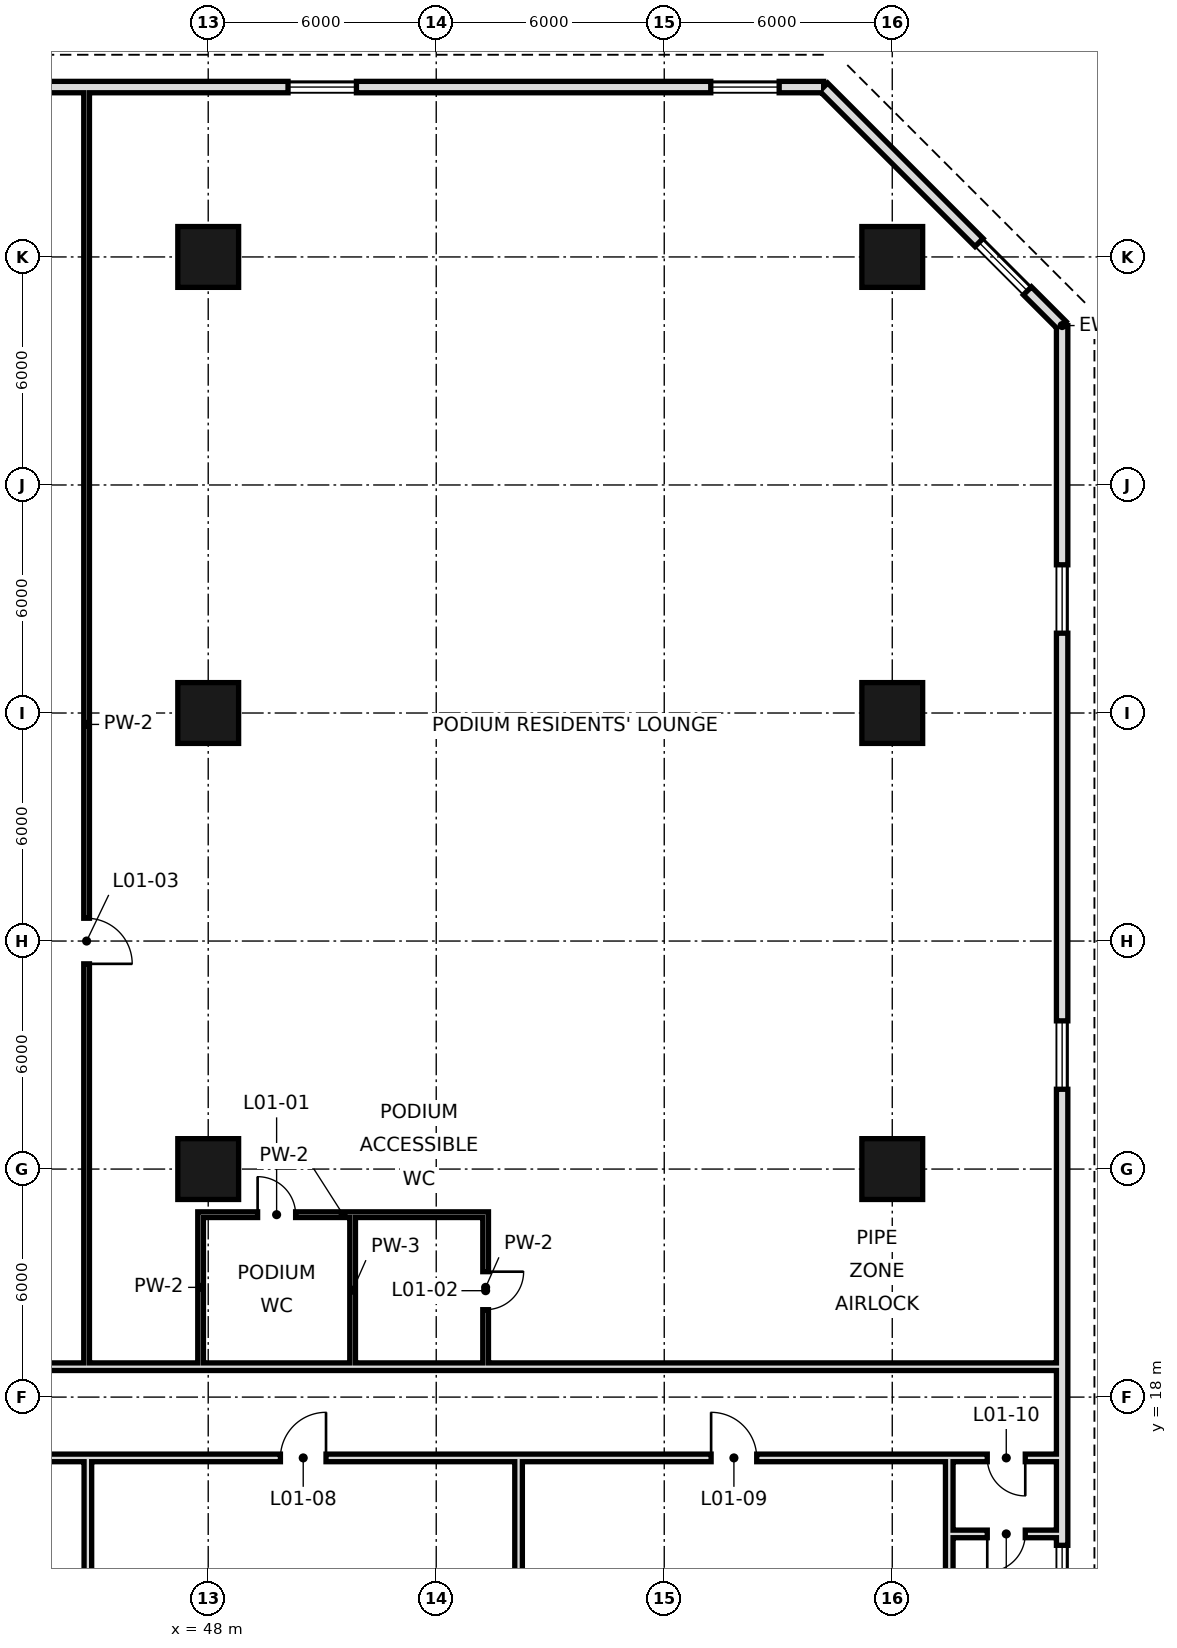
"""IFC4 building model, lengths in metres.
Left out: names, types, materials, properties, quantities, classifications, styles, units other than length and angle.
Written with IfcOpenShell. Run it as: python <this file> out.ifc"""

import sys

from ifc_helpers import new_model, si_unit, direction, frame, frame_2d, origin, origin_2d, place, context, subcontext, project, spatial, rectangle, hollow_rectangle, extrude, element, fill, save


model = new_model("IFC4")
c1 = context("Model", 3, precision=1e-05, world=origin(), true_north=direction((0.0, 1.0)))
c2 = subcontext(c1, "Body", "Model", "MODEL_VIEW")
j1 = project(units=[si_unit("LENGTHUNIT", "METRE"), si_unit("PLANEANGLEUNIT", "RADIAN")], contexts=[c1])
p1 = place(None, origin())
s1 = spatial("IfcSite", under=j1, at=p1, CompositionType="ELEMENT")
p2 = place(p1, origin())
s2 = spatial("IfcBuilding", under=s1, at=p2, CompositionType="ELEMENT")
p3 = place(p2, frame((0.0, 0.0, 15.0)))
s3 = spatial("IfcBuildingStorey", under=s2, at=p3, CompositionType="ELEMENT", Elevation=15.0)
for number, where, z_axis, x_axis in (
    (1, (48.0, 24.0, 0.0), (0.0, 0.0, 1.0), (1.0, 0.0, 0.0)),
    (2, (48.0, 36.0, 0.0), (0.0, 0.0, 1.0), (1.0, 0.0, 0.0)),
    (3, (48.0, 48.0, 0.0), (0.0, 0.0, 1.0), (1.0, 0.0, 0.0)),
    (4, (66.0, 24.0, 0.0), (0.0, 0.0, 1.0), (1.0, 0.0, 0.0)),
    (5, (66.0, 36.0, 0.0), (0.0, 0.0, 1.0), (1.0, 0.0, 0.0)),
    (6, (66.0, 48.0, 0.0), (0.0, 0.0, 1.0), (1.0, 0.0, 0.0)),
):
    element("IfcColumn", number, at=place(p3, frame(where, z_axis=z_axis, x_axis=x_axis)), inside=s3, PredefinedType="COLUMN", context=c2, shape_type="SweptSolid", body=[
        extrude(hollow_rectangle(XDim=1.6, YDim=1.6, WallThickness=0.07, at=origin_2d()), origin(), (0.0, 0.0, 1.0), 5.4),
    ])
p4 = place(p3, frame((70.47, -0.195, 0.0), z_axis=(0.0, 0.0, 1.0), x_axis=(0.0, 1.0, 0.0)))
e7 = element("IfcWall", 7, at=p4, inside=s3, PredefinedType="SOLIDWALL", context=c2, shape_type="SweptSolid", body=[
    extrude(rectangle(XDim=46.389, YDim=0.3, at=frame_2d((23.195, 0.0))), origin(), (0.0, 0.0, 1.0), 5.0),
])
p5 = place(p4, frame((2.17, 0.0, 0.9)))
e8 = element("IfcOpeningElement", 8, at=p5, cuts=e7, PredefinedType="OPENING", context=c2, shape_type="SweptSolid", body=[
    extrude(rectangle(XDim=1.8, YDim=1.5, at=frame_2d((0.9, 0.75))), frame((0.0, 0.16, 0.0), z_axis=(0.0, -1.0, 0.0), x_axis=(1.0, 0.0, 0.0)), (0.0, 0.0, 1.0), 0.32),
])
p6 = place(p4, frame((12.495, 0.0, 0.9)))
e9 = element("IfcOpeningElement", 9, at=p6, cuts=e7, PredefinedType="OPENING", context=c2, shape_type="SweptSolid", body=[
    extrude(rectangle(XDim=1.8, YDim=1.5, at=frame_2d((0.9, 0.75))), frame((0.0, 0.16, 0.0), z_axis=(0.0, -1.0, 0.0), x_axis=(1.0, 0.0, 0.0)), (0.0, 0.0, 1.0), 0.32),
])
p7 = place(p4, frame((26.295, 0.0, 0.9)))
e10 = element("IfcOpeningElement", 10, at=p7, cuts=e7, PredefinedType="OPENING", context=c2, shape_type="SweptSolid", body=[
    extrude(rectangle(XDim=1.8, YDim=1.5, at=frame_2d((0.9, 0.75))), frame((0.0, 0.16, 0.0), z_axis=(0.0, -1.0, 0.0), x_axis=(1.0, 0.0, 0.0)), (0.0, 0.0, 1.0), 0.32),
])
p8 = place(p4, frame((38.295, 0.0, 0.9)))
e11 = element("IfcOpeningElement", 11, at=p8, cuts=e7, PredefinedType="OPENING", context=c2, shape_type="SweptSolid", body=[
    extrude(rectangle(XDim=1.8, YDim=1.5, at=frame_2d((0.9, 0.75))), frame((0.0, 0.16, 0.0), z_axis=(0.0, -1.0, 0.0), x_axis=(1.0, 0.0, 0.0)), (0.0, 0.0, 1.0), 0.32),
])
p9 = place(p3, frame((70.47, 46.195, 0.0), z_axis=(0.0, 0.0, 1.0), x_axis=(-0.707106781187, 0.707106781187, 0.0)))
e12 = element("IfcWall", 12, at=p9, inside=s3, PredefinedType="SOLIDWALL", context=c2, shape_type="SweptSolid", body=[
    extrude(rectangle(XDim=8.875, YDim=0.3, at=frame_2d((4.438, 0.0))), origin(), (0.0, 0.0, 1.0), 5.0),
])
p10 = place(p9, frame((1.292, 0.0, 0.9)))
e13 = element("IfcOpeningElement", 13, at=p10, cuts=e12, PredefinedType="OPENING", context=c2, shape_type="SweptSolid", body=[
    extrude(rectangle(XDim=1.8, YDim=1.5, at=frame_2d((0.9, 0.75))), frame((0.0, 0.16, 0.0), z_axis=(0.0, -1.0, 0.0), x_axis=(1.0, 0.0, 0.0)), (0.0, 0.0, 1.0), 0.32),
])
p11 = place(p3, frame((64.195, 52.47, 0.0), z_axis=(0.0, 0.0, 1.0), x_axis=(-1.0, 0.0, 0.0)))
e14 = element("IfcWall", 14, at=p11, inside=s3, PredefinedType="SOLIDWALL", context=c2, shape_type="SweptSolid", body=[
    extrude(rectangle(XDim=58.389, YDim=0.3, at=frame_2d((29.195, 0.0))), origin(), (0.0, 0.0, 1.0), 5.0),
])
p12 = place(p11, frame((1.17, 0.0, 0.9)))
e15 = element("IfcOpeningElement", 15, at=p12, cuts=e14, PredefinedType="OPENING", context=c2, shape_type="SweptSolid", body=[
    extrude(rectangle(XDim=1.8, YDim=1.5, at=frame_2d((0.9, 0.75))), frame((0.0, 0.16, 0.0), z_axis=(0.0, -1.0, 0.0), x_axis=(1.0, 0.0, 0.0)), (0.0, 0.0, 1.0), 0.32),
])
p13 = place(p11, frame((12.295, 0.0, 0.9)))
e16 = element("IfcOpeningElement", 16, at=p13, cuts=e14, PredefinedType="OPENING", context=c2, shape_type="SweptSolid", body=[
    extrude(rectangle(XDim=1.8, YDim=1.5, at=frame_2d((0.9, 0.75))), frame((0.0, 0.16, 0.0), z_axis=(0.0, -1.0, 0.0), x_axis=(1.0, 0.0, 0.0)), (0.0, 0.0, 1.0), 0.32),
])
p14 = place(p11, frame((24.295, 0.0, 0.9)))
e17 = element("IfcOpeningElement", 17, at=p14, cuts=e14, PredefinedType="OPENING", context=c2, shape_type="SweptSolid", body=[
    extrude(rectangle(XDim=1.8, YDim=1.5, at=frame_2d((0.9, 0.75))), frame((0.0, 0.16, 0.0), z_axis=(0.0, -1.0, 0.0), x_axis=(1.0, 0.0, 0.0)), (0.0, 0.0, 1.0), 0.32),
])
p15 = place(p11, frame((36.295, 0.0, 0.9)))
e18 = element("IfcOpeningElement", 18, at=p15, cuts=e14, PredefinedType="OPENING", context=c2, shape_type="SweptSolid", body=[
    extrude(rectangle(XDim=1.8, YDim=1.5, at=frame_2d((0.9, 0.75))), frame((0.0, 0.16, 0.0), z_axis=(0.0, -1.0, 0.0), x_axis=(1.0, 0.0, 0.0)), (0.0, 0.0, 1.0), 0.32),
])
p16 = place(p11, frame((48.295, 0.0, 0.9)))
e19 = element("IfcOpeningElement", 19, at=p16, cuts=e14, PredefinedType="OPENING", context=c2, shape_type="SweptSolid", body=[
    extrude(rectangle(XDim=1.8, YDim=1.5, at=frame_2d((0.9, 0.75))), frame((0.0, 0.16, 0.0), z_axis=(0.0, -1.0, 0.0), x_axis=(1.0, 0.0, 0.0)), (0.0, 0.0, 1.0), 0.32),
])
p17 = place(p3, frame((44.8, 18.9, 0.0), z_axis=(0.0, 0.0, 1.0), x_axis=(0.0, 1.0, 0.0)))
e20 = element("IfcWall", 20, at=p17, inside=s3, PredefinedType="PARTITIONING", context=c2, shape_type="SweptSolid", body=[
    extrude(rectangle(XDim=33.6, YDim=0.15, at=frame_2d((16.8, 0.0))), origin(), (0.0, 0.0, 1.0), 5.0),
])
p18 = place(p17, frame((10.5, 0.0, 0.0)))
e21 = element("IfcOpeningElement", 21, at=p18, cuts=e20, PredefinedType="OPENING", context=c2, shape_type="SweptSolid", body=[
    extrude(rectangle(XDim=1.2, YDim=2.4, at=frame_2d((0.6, 1.2))), frame((0.0, 0.085, 0.0), z_axis=(0.0, -1.0, 0.0), x_axis=(1.0, 0.0, 0.0)), (0.0, 0.0, 1.0), 0.17),
])
p19 = place(p3, frame((44.833, -6.5, 0.0), z_axis=(0.0, 0.0, 1.0), x_axis=(0.0, 1.0, 0.0)))
e22 = element("IfcWall", 22, at=p19, inside=s3, PredefinedType="SOLIDWALL", context=c2, shape_type="SweptSolid", body=[
    extrude(rectangle(XDim=22.8, YDim=0.2, at=frame_2d((11.4, 0.0))), origin(), (0.0, 0.0, 1.0), 3.2),
])
p20 = place(p3, frame((47.8, 18.9, 0.0), z_axis=(0.0, 0.0, 1.0), x_axis=(0.0, 1.0, 0.0)))
e23 = element("IfcWall", 23, at=p20, inside=s3, PredefinedType="PARTITIONING", context=c2, shape_type="SweptSolid", body=[
    extrude(rectangle(XDim=3.975, YDim=0.15, at=frame_2d((1.988, 0.0))), origin(), (0.0, 0.0, 1.0), 3.2),
])
p21 = place(p3, frame((51.8, 18.9, 0.0), z_axis=(0.0, 0.0, 1.0), x_axis=(0.0, 1.0, 0.0)))
e24 = element("IfcWall", 24, at=p21, inside=s3, PredefinedType="PARTITIONING", context=c2, shape_type="SweptSolid", body=[
    extrude(rectangle(XDim=3.825, YDim=0.15, at=frame_2d((1.913, 0.0))), origin(), (0.0, 0.0, 1.0), 5.0),
])
p22 = place(p3, frame((55.3, 18.9, 0.0), z_axis=(0.0, 0.0, 1.0), x_axis=(0.0, 1.0, 0.0)))
e25 = element("IfcWall", 25, at=p22, inside=s3, PredefinedType="PARTITIONING", context=c2, shape_type="SweptSolid", body=[
    extrude(rectangle(XDim=3.975, YDim=0.15, at=frame_2d((1.988, 0.0))), origin(), (0.0, 0.0, 1.0), 5.0),
])
p23 = place(p22, frame((1.4, 0.0, 0.0)))
e26 = element("IfcOpeningElement", 26, at=p23, cuts=e25, PredefinedType="OPENING", context=c2, shape_type="SweptSolid", body=[
    extrude(rectangle(XDim=1.0, YDim=2.4, at=frame_2d((0.5, 1.2))), frame((0.0, 0.085, 0.0), z_axis=(0.0, -1.0, 0.0), x_axis=(1.0, 0.0, 0.0)), (0.0, 0.0, 1.0), 0.17),
])
p24 = place(p3, frame((56.167, -6.5, 0.0), z_axis=(0.0, 0.0, 1.0), x_axis=(0.0, 1.0, 0.0)))
e27 = element("IfcWall", 27, at=p24, inside=s3, PredefinedType="SOLIDWALL", context=c2, shape_type="SweptSolid", body=[
    extrude(rectangle(XDim=22.8, YDim=0.2, at=frame_2d((11.4, 0.0))), origin(), (0.0, 0.0, 1.0), 3.2),
])
p25 = place(p3, frame((67.5, -3.207, 0.0), z_axis=(0.0, 0.0, 1.0), x_axis=(0.0, 1.0, 0.0)))
e28 = element("IfcWall", 28, at=p25, inside=s3, PredefinedType="SOLIDWALL", context=c2, shape_type="SweptSolid", body=[
    extrude(rectangle(XDim=19.507, YDim=0.2, at=frame_2d((9.753, 0.0))), origin(), (0.0, 0.0, 1.0), 3.2),
])
p26 = place(p3, frame((67.6, 14.4, 0.0), z_axis=(0.0, 0.0, 1.0), x_axis=(1.0, 0.0, 0.0)))
e29 = element("IfcWall", 29, at=p26, inside=s3, PredefinedType="SOLIDWALL", context=c2, shape_type="SweptSolid", body=[
    extrude(rectangle(XDim=2.9, YDim=0.2, at=frame_2d((1.45, 0.0))), origin(), (0.0, 0.0, 1.0), 5.0),
])
p27 = place(p26, frame((0.9, 0.0, 0.0)))
e30 = element("IfcOpeningElement", 30, at=p27, cuts=e29, PredefinedType="OPENING", context=c2, shape_type="SweptSolid", body=[
    extrude(rectangle(XDim=1.0, YDim=2.4, at=frame_2d((0.5, 1.2))), frame((0.0, 0.11, 0.0), z_axis=(0.0, -1.0, 0.0), x_axis=(1.0, 0.0, 0.0)), (0.0, 0.0, 1.0), 0.22),
])
p28 = place(p3, frame((-0.5, 16.4, 0.0), z_axis=(0.0, 0.0, 1.0), x_axis=(1.0, 0.0, 0.0)))
e31 = element("IfcWall", 31, at=p28, inside=s3, PredefinedType="SOLIDWALL", context=c2, shape_type="SweptSolid", body=[
    extrude(rectangle(XDim=71.0, YDim=0.2, at=frame_2d((35.5, 0.0))), origin(), (0.0, 0.0, 1.0), 3.2),
])
p29 = place(p28, frame((5.067, 0.0, 0.0)))
e32 = element("IfcOpeningElement", 32, at=p29, cuts=e31, PredefinedType="OPENING", context=c2, shape_type="SweptSolid", body=[
    extrude(rectangle(XDim=1.2, YDim=2.4, at=frame_2d((0.6, 1.2))), frame((0.0, 0.11, 0.0), z_axis=(0.0, -1.0, 0.0), x_axis=(1.0, 0.0, 0.0)), (0.0, 0.0, 1.0), 0.22),
])
p30 = place(p28, frame((16.4, 0.0, 0.0)))
e33 = element("IfcOpeningElement", 33, at=p30, cuts=e31, PredefinedType="OPENING", context=c2, shape_type="SweptSolid", body=[
    extrude(rectangle(XDim=1.2, YDim=2.4, at=frame_2d((0.6, 1.2))), frame((0.0, 0.11, 0.0), z_axis=(0.0, -1.0, 0.0), x_axis=(1.0, 0.0, 0.0)), (0.0, 0.0, 1.0), 0.22),
])
p31 = place(p28, frame((27.733, 0.0, 0.0)))
e34 = element("IfcOpeningElement", 34, at=p31, cuts=e31, PredefinedType="OPENING", context=c2, shape_type="SweptSolid", body=[
    extrude(rectangle(XDim=1.2, YDim=2.4, at=frame_2d((0.6, 1.2))), frame((0.0, 0.11, 0.0), z_axis=(0.0, -1.0, 0.0), x_axis=(1.0, 0.0, 0.0)), (0.0, 0.0, 1.0), 0.22),
])
p32 = place(p28, frame((39.067, 0.0, 0.0)))
e35 = element("IfcOpeningElement", 35, at=p32, cuts=e31, PredefinedType="OPENING", context=c2, shape_type="SweptSolid", body=[
    extrude(rectangle(XDim=1.2, YDim=2.4, at=frame_2d((0.6, 1.2))), frame((0.0, 0.11, 0.0), z_axis=(0.0, -1.0, 0.0), x_axis=(1.0, 0.0, 0.0)), (0.0, 0.0, 1.0), 0.22),
])
p33 = place(p28, frame((50.4, 0.0, 0.0)))
e36 = element("IfcOpeningElement", 36, at=p33, cuts=e31, PredefinedType="OPENING", context=c2, shape_type="SweptSolid", body=[
    extrude(rectangle(XDim=1.2, YDim=2.4, at=frame_2d((0.6, 1.2))), frame((0.0, 0.11, 0.0), z_axis=(0.0, -1.0, 0.0), x_axis=(1.0, 0.0, 0.0)), (0.0, 0.0, 1.0), 0.22),
])
p34 = place(p28, frame((61.733, 0.0, 0.0)))
e37 = element("IfcOpeningElement", 37, at=p34, cuts=e31, PredefinedType="OPENING", context=c2, shape_type="SweptSolid", body=[
    extrude(rectangle(XDim=1.2, YDim=2.4, at=frame_2d((0.6, 1.2))), frame((0.0, 0.11, 0.0), z_axis=(0.0, -1.0, 0.0), x_axis=(1.0, 0.0, 0.0)), (0.0, 0.0, 1.0), 0.22),
])
p35 = place(p28, frame((69.0, 0.0, 0.0)))
e38 = element("IfcOpeningElement", 38, at=p35, cuts=e31, PredefinedType="OPENING", context=c2, shape_type="SweptSolid", body=[
    extrude(rectangle(XDim=1.0, YDim=2.4, at=frame_2d((0.5, 1.2))), frame((0.0, 0.11, 0.0), z_axis=(0.0, -1.0, 0.0), x_axis=(1.0, 0.0, 0.0)), (0.0, 0.0, 1.0), 0.22),
])
p36 = place(p3, frame((-0.5, 18.8, 0.0), z_axis=(0.0, 0.0, 1.0), x_axis=(1.0, 0.0, 0.0)))
e39 = element("IfcWall", 39, at=p36, inside=s3, PredefinedType="SOLIDWALL", context=c2, shape_type="SweptSolid", body=[
    extrude(rectangle(XDim=71.0, YDim=0.2, at=frame_2d((35.5, 0.0))), origin(), (0.0, 0.0, 1.0), 3.2),
])
p37 = place(p36, frame((11.1, 0.0, 0.0)))
e40 = element("IfcOpeningElement", 40, at=p37, cuts=e39, PredefinedType="OPENING", context=c2, shape_type="SweptSolid", body=[
    extrude(rectangle(XDim=1.2, YDim=2.4, at=frame_2d((0.6, 1.2))), frame((0.0, 0.11, 0.0), z_axis=(0.0, -1.0, 0.0), x_axis=(1.0, 0.0, 0.0)), (0.0, 0.0, 1.0), 0.22),
])
p38 = place(p3, frame((47.875, 22.8, 0.0), z_axis=(0.0, 0.0, 1.0), x_axis=(1.0, 0.0, 0.0)))
e41 = element("IfcWall", 41, at=p38, inside=s3, PredefinedType="PARTITIONING", context=c2, shape_type="SweptSolid", body=[
    extrude(rectangle(XDim=7.35, YDim=0.15, at=frame_2d((3.675, 0.0))), origin(), (0.0, 0.0, 1.0), 5.0),
])
p39 = place(p38, frame((1.425, 0.0, 0.0)))
e42 = element("IfcOpeningElement", 42, at=p39, cuts=e41, PredefinedType="OPENING", context=c2, shape_type="SweptSolid", body=[
    extrude(rectangle(XDim=1.0, YDim=2.4, at=frame_2d((0.5, 1.2))), frame((0.0, 0.085, 0.0), z_axis=(0.0, -1.0, 0.0), x_axis=(1.0, 0.0, 0.0)), (0.0, 0.0, 1.0), 0.17),
])
p40 = place(p6, origin())
e43 = element("IfcWindow", 43, at=p40, inside=s3, PartitioningType="SINGLE_PANEL", PredefinedType="WINDOW", context=c2, shape_type="SweptSolid", body=[
    extrude(rectangle(XDim=1.8, YDim=1.5, at=frame_2d((0.9, 0.75))), frame((0.0, 0.03, 0.0), z_axis=(0.0, -1.0, 0.0), x_axis=(1.0, 0.0, 0.0)), (0.0, 0.0, 1.0), 0.06),
])
fill(e9, e43)
p41 = place(p7, origin())
e44 = element("IfcWindow", 44, at=p41, inside=s3, PartitioningType="SINGLE_PANEL", PredefinedType="WINDOW", context=c2, shape_type="SweptSolid", body=[
    extrude(rectangle(XDim=1.8, YDim=1.5, at=frame_2d((0.9, 0.75))), frame((0.0, 0.03, 0.0), z_axis=(0.0, -1.0, 0.0), x_axis=(1.0, 0.0, 0.0)), (0.0, 0.0, 1.0), 0.06),
])
fill(e10, e44)
p42 = place(p8, origin())
e45 = element("IfcWindow", 45, at=p42, inside=s3, PartitioningType="SINGLE_PANEL", PredefinedType="WINDOW", context=c2, shape_type="SweptSolid", body=[
    extrude(rectangle(XDim=1.8, YDim=1.5, at=frame_2d((0.9, 0.75))), frame((0.0, 0.03, 0.0), z_axis=(0.0, -1.0, 0.0), x_axis=(1.0, 0.0, 0.0)), (0.0, 0.0, 1.0), 0.06),
])
fill(e11, e45)
p43 = place(p10, origin())
e46 = element("IfcWindow", 46, at=p43, inside=s3, PartitioningType="SINGLE_PANEL", PredefinedType="WINDOW", context=c2, shape_type="SweptSolid", body=[
    extrude(rectangle(XDim=1.8, YDim=1.5, at=frame_2d((0.9, 0.75))), frame((0.0, 0.03, 0.0), z_axis=(0.0, -1.0, 0.0), x_axis=(1.0, 0.0, 0.0)), (0.0, 0.0, 1.0), 0.06),
])
fill(e13, e46)
p44 = place(p12, origin())
e47 = element("IfcWindow", 47, at=p44, inside=s3, PartitioningType="SINGLE_PANEL", PredefinedType="WINDOW", context=c2, shape_type="SweptSolid", body=[
    extrude(rectangle(XDim=1.8, YDim=1.5, at=frame_2d((0.9, 0.75))), frame((0.0, 0.03, 0.0), z_axis=(0.0, -1.0, 0.0), x_axis=(1.0, 0.0, 0.0)), (0.0, 0.0, 1.0), 0.06),
])
fill(e15, e47)
p45 = place(p13, origin())
e48 = element("IfcWindow", 48, at=p45, inside=s3, PartitioningType="SINGLE_PANEL", PredefinedType="WINDOW", context=c2, shape_type="SweptSolid", body=[
    extrude(rectangle(XDim=1.8, YDim=1.5, at=frame_2d((0.9, 0.75))), frame((0.0, 0.03, 0.0), z_axis=(0.0, -1.0, 0.0), x_axis=(1.0, 0.0, 0.0)), (0.0, 0.0, 1.0), 0.06),
])
fill(e16, e48)
p46 = place(p39, origin())
e49 = element("IfcDoor", 49, at=p46, inside=s3, OperationType="SINGLE_SWING_LEFT", PredefinedType="DOOR", context=c2, shape_type="SweptSolid", body=[
    extrude(rectangle(XDim=1.0, YDim=2.4, at=frame_2d((0.5, 1.2))), frame((0.0, 0.025, 0.0), z_axis=(0.0, -1.0, 0.0), x_axis=(1.0, 0.0, 0.0)), (0.0, 0.0, 1.0), 0.05),
])
fill(e42, e49)
p47 = place(p23, origin())
e50 = element("IfcDoor", 50, at=p47, inside=s3, OperationType="SINGLE_SWING_RIGHT", PredefinedType="DOOR", context=c2, shape_type="SweptSolid", body=[
    extrude(rectangle(XDim=1.0, YDim=2.4, at=frame_2d((0.5, 1.2))), frame((0.0, 0.025, 0.0), z_axis=(0.0, -1.0, 0.0), x_axis=(1.0, 0.0, 0.0)), (0.0, 0.0, 1.0), 0.05),
])
fill(e26, e50)
p48 = place(p18, frame((1.2, 0.0, 0.0), z_axis=(0.0, 0.0, 1.0), x_axis=(-1.0, 0.0, 0.0)))
e51 = element("IfcDoor", 51, at=p48, inside=s3, OperationType="SINGLE_SWING_RIGHT", PredefinedType="DOOR", context=c2, shape_type="SweptSolid", body=[
    extrude(rectangle(XDim=1.2, YDim=2.4, at=frame_2d((0.6, 1.2))), frame((0.0, 0.025, 0.0), z_axis=(0.0, -1.0, 0.0), x_axis=(1.0, 0.0, 0.0)), (0.0, 0.0, 1.0), 0.05),
])
fill(e21, e51)
p49 = place(p33, frame((1.2, 0.0, 0.0), z_axis=(0.0, 0.0, 1.0), x_axis=(-1.0, 0.0, 0.0)))
e52 = element("IfcDoor", 52, at=p49, inside=s3, OperationType="SINGLE_SWING_LEFT", PredefinedType="DOOR", context=c2, shape_type="SweptSolid", body=[
    extrude(rectangle(XDim=1.2, YDim=2.4, at=frame_2d((0.6, 1.2))), frame((0.0, 0.025, 0.0), z_axis=(0.0, -1.0, 0.0), x_axis=(1.0, 0.0, 0.0)), (0.0, 0.0, 1.0), 0.05),
])
fill(e36, e52)
p50 = place(p34, origin())
e53 = element("IfcDoor", 53, at=p50, inside=s3, OperationType="SINGLE_SWING_LEFT", PredefinedType="DOOR", context=c2, shape_type="SweptSolid", body=[
    extrude(rectangle(XDim=1.2, YDim=2.4, at=frame_2d((0.6, 1.2))), frame((0.0, 0.025, 0.0), z_axis=(0.0, -1.0, 0.0), x_axis=(1.0, 0.0, 0.0)), (0.0, 0.0, 1.0), 0.05),
])
fill(e37, e53)
p51 = place(p35, origin())
e54 = element("IfcDoor", 54, at=p51, inside=s3, OperationType="SINGLE_SWING_RIGHT", PredefinedType="DOOR", context=c2, shape_type="SweptSolid", body=[
    extrude(rectangle(XDim=1.0, YDim=2.4, at=frame_2d((0.5, 1.2))), frame((0.0, 0.025, 0.0), z_axis=(0.0, -1.0, 0.0), x_axis=(1.0, 0.0, 0.0)), (0.0, 0.0, 1.0), 0.05),
])
fill(e38, e54)
p52 = place(p27, frame((1.0, 0.0, 0.0), z_axis=(0.0, 0.0, 1.0), x_axis=(-1.0, 0.0, 0.0)))
e55 = element("IfcDoor", 55, at=p52, inside=s3, OperationType="SINGLE_SWING_RIGHT", PredefinedType="DOOR", context=c2, shape_type="SweptSolid", body=[
    extrude(rectangle(XDim=1.0, YDim=2.4, at=frame_2d((0.5, 1.2))), frame((0.0, 0.025, 0.0), z_axis=(0.0, -1.0, 0.0), x_axis=(1.0, 0.0, 0.0)), (0.0, 0.0, 1.0), 0.05),
])
fill(e30, e55)
save(model, sys.argv[1])
